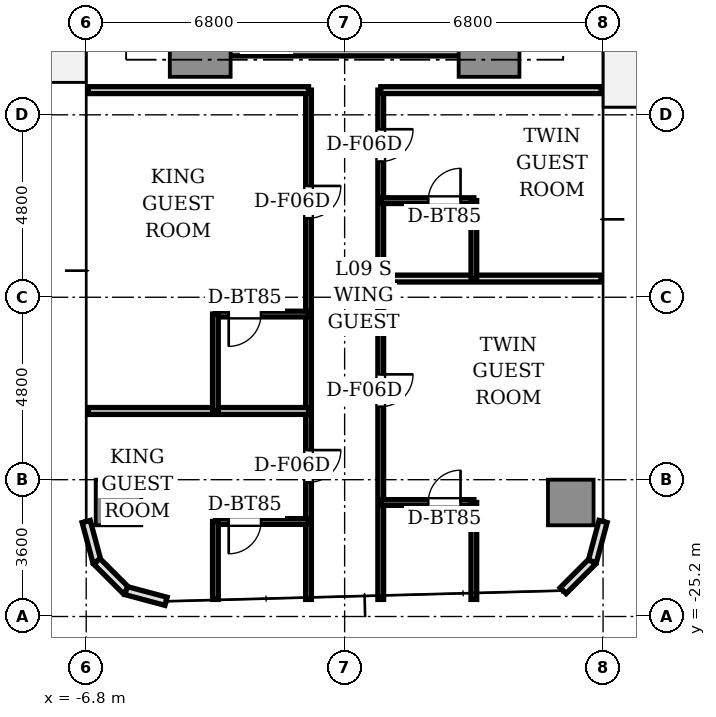
"""IFC4 building model, lengths in metres.
Left out: names, types, materials, properties, quantities, classifications, styles, units other than length and angle.
Written with IfcOpenShell. Run it as: python <this file> out.ifc"""

import sys

from ifc_helpers import new_model, si_unit, direction, frame, frame_2d, origin, origin_2d, place, context, subcontext, project, spatial, rectangle, extrude, source, transform, mapped, element, fill, save


model = new_model("IFC4")
c1 = context("Model", 3, precision=1e-05, world=origin(), true_north=direction((0.0, 1.0)))
c2 = subcontext(c1, "Body", "Model", "MODEL_VIEW")
j1 = project(units=[si_unit("LENGTHUNIT", "METRE"), si_unit("PLANEANGLEUNIT", "RADIAN")], contexts=[c1])
p1 = place(None, origin())
s1 = spatial("IfcSite", under=j1, at=p1, CompositionType="ELEMENT")
p2 = place(p1, origin())
s2 = spatial("IfcBuilding", under=s1, at=p2, CompositionType="ELEMENT")
p3 = place(p2, frame((0.0, 0.0, 36.5)))
s3 = spatial("IfcBuildingStorey", under=s2, at=p3, CompositionType="ELEMENT", Elevation=36.5)
p4 = place(p3, frame((-3.55, -10.2, 0.0), z_axis=(0.0, 0.0, 1.0), x_axis=(1.0, 0.0, 0.0)))
e1 = element("IfcWall", 1, at=p4, inside=s3, PredefinedType="SHEAR", context=c2, shape_type="SweptSolid", body=[
    extrude(rectangle(XDim=7.1, YDim=0.5, at=frame_2d((3.55, 0.0))), origin(), (0.0, 0.0, 1.0), 3.11),
])
m1 = source(origin(), c2, "Body", "SweptSolid", [
    extrude(rectangle(XDim=1.6, YDim=1.6, at=origin_2d()), origin(), (0.0, 0.0, 1.0), 3.11),
])
for number, where, z_axis, x_axis in (
    (2, (-3.8, -10.2, 0.0), (0.0, 0.0, 1.0), (1.0, 0.0, 0.0)),
    (3, (3.8, -10.2, 0.0), (0.0, 0.0, 1.0), (1.0, 0.0, 0.0)),
):
    element("IfcColumn", number, at=place(p3, frame(where, z_axis=z_axis, x_axis=x_axis)), inside=s3, PredefinedType="COLUMN", context=c2, shape_type="MappedRepresentation", body=[
        mapped(m1, transform((0.0, 0.0, 0.0), scale=1.0)),
    ])
m2 = source(origin(), c2, "Body", "SweptSolid", [
    extrude(rectangle(XDim=1.2, YDim=1.2, at=origin_2d()), origin(), (0.0, 0.0, 1.0), 3.11),
])
for number, where, z_axis, x_axis in (
    (4, (-5.95, -22.2, 0.0), (0.0, 0.0, 1.0), (1.0, 0.0, 0.0)),
    (5, (5.95, -22.2, 0.0), (0.0, 0.0, 1.0), (1.0, 0.0, 0.0)),
):
    element("IfcColumn", number, at=place(p3, frame(where, z_axis=z_axis, x_axis=x_axis)), inside=s3, PredefinedType="COLUMN", context=c2, shape_type="MappedRepresentation", body=[
        mapped(m2, transform((0.0, 0.0, 0.0), scale=1.0)),
    ])
for number, where, z_axis, x_axis in (
    (6, (-6.8, -22.7, 0.0), (0.0, 0.0, 1.0), (0.259, -0.966, 0.0)),
    (7, (-6.519, -23.75, 0.0), (0.0, 0.0, 1.0), (0.707, -0.707, 0.0)),
    (8, (-5.75, -24.519, 0.0), (0.0, 0.0, 1.0), (0.966, -0.259, 0.0)),
    (9, (5.75, -24.519, 0.0), (0.0, 0.0, 1.0), (0.707, 0.707, 0.0)),
    (10, (6.519, -23.75, 0.0), (0.0, 0.0, 1.0), (0.259, 0.966, 0.0)),
):
    element("IfcWall", number, at=place(p3, frame(where, z_axis=z_axis, x_axis=x_axis)), inside=s3, PredefinedType="STANDARD", context=c2, shape_type="SweptSolid", body=[
        extrude(rectangle(XDim=1.087, YDim=0.22, at=frame_2d((0.543, 0.0))), origin(), (0.0, 0.0, 1.0), 3.11),
    ])
p5 = place(p3, frame((0.95, -11.35, 0.0), z_axis=(0.0, 0.0, 1.0), x_axis=(0.0, -1.0, 0.0)))
e11 = element("IfcWall", 11, at=p5, inside=s3, PredefinedType="PARTITIONING", context=c2, shape_type="SweptSolid", body=[
    extrude(rectangle(XDim=13.4, YDim=0.15, at=frame_2d((6.7, 0.0))), origin(), (0.0, 0.0, 1.0), 2.66),
])
p6 = place(p5, frame((1.029, 0.0, 0.0)))
e12 = element("IfcOpeningElement", 12, at=p6, cuts=e11, PredefinedType="OPENING", context=c2, shape_type="SweptSolid", body=[
    extrude(rectangle(XDim=0.85, YDim=2.1, at=frame_2d((0.425, 1.05))), frame((0.0, 0.085, 0.0), z_axis=(0.0, -1.0, 0.0), x_axis=(1.0, 0.0, 0.0)), (0.0, 0.0, 1.0), 0.17),
])
p7 = place(p5, frame((7.479, 0.0, 0.0)))
e13 = element("IfcOpeningElement", 13, at=p7, cuts=e11, PredefinedType="OPENING", context=c2, shape_type="SweptSolid", body=[
    extrude(rectangle(XDim=0.85, YDim=2.1, at=frame_2d((0.425, 1.05))), frame((0.0, 0.085, 0.0), z_axis=(0.0, -1.0, 0.0), x_axis=(1.0, 0.0, 0.0)), (0.0, 0.0, 1.0), 0.17),
])
p8 = place(p3, frame((-0.95, -11.35, 0.0), z_axis=(0.0, 0.0, 1.0), x_axis=(0.0, -1.0, 0.0)))
e14 = element("IfcWall", 14, at=p8, inside=s3, PredefinedType="PARTITIONING", context=c2, shape_type="SweptSolid", body=[
    extrude(rectangle(XDim=13.4, YDim=0.15, at=frame_2d((6.7, 0.0))), origin(), (0.0, 0.0, 1.0), 2.66),
])
p9 = place(p8, frame((2.521, 0.0, 0.0)))
e15 = element("IfcOpeningElement", 15, at=p9, cuts=e14, PredefinedType="OPENING", context=c2, shape_type="SweptSolid", body=[
    extrude(rectangle(XDim=0.85, YDim=2.1, at=frame_2d((0.425, 1.05))), frame((0.0, 0.085, 0.0), z_axis=(0.0, -1.0, 0.0), x_axis=(1.0, 0.0, 0.0)), (0.0, 0.0, 1.0), 0.17),
])
p10 = place(p8, frame((9.471, 0.0, 0.0)))
e16 = element("IfcOpeningElement", 16, at=p10, cuts=e14, PredefinedType="OPENING", context=c2, shape_type="SweptSolid", body=[
    extrude(rectangle(XDim=0.85, YDim=2.1, at=frame_2d((0.425, 1.05))), frame((0.0, 0.085, 0.0), z_axis=(0.0, -1.0, 0.0), x_axis=(1.0, 0.0, 0.0)), (0.0, 0.0, 1.0), 0.17),
])
for number, where, z_axis, x_axis in (
    (17, (0.95, -11.35, 0.0), (0.0, 0.0, 1.0), (1.0, 0.0, 0.0)),
    (18, (-6.75, -11.35, 0.0), (0.0, 0.0, 1.0), (1.0, 0.0, 0.0)),
    (19, (0.95, -16.308, 0.0), (0.0, 0.0, 1.0), (1.0, 0.0, 0.0)),
):
    element("IfcWall", number, at=place(p3, frame(where, z_axis=z_axis, x_axis=x_axis)), inside=s3, PredefinedType="PARTITIONING", context=c2, shape_type="SweptSolid", body=[
        extrude(rectangle(XDim=5.8, YDim=0.18, at=frame_2d((2.9, 0.0))), origin(), (0.0, 0.0, 1.0), 2.66),
    ])
p11 = place(p3, frame((0.95, -14.258, 0.0), z_axis=(0.0, 0.0, 1.0), x_axis=(1.0, 0.0, 0.0)))
e20 = element("IfcWall", 20, at=p11, inside=s3, PredefinedType="PARTITIONING", context=c2, shape_type="SweptSolid", body=[
    extrude(rectangle(XDim=2.45, YDim=0.15, at=frame_2d((1.225, 0.0))), origin(), (0.0, 0.0, 1.0), 2.66),
])
p12 = place(p11, frame((1.25, 0.0, 0.0)))
e21 = element("IfcOpeningElement", 21, at=p12, cuts=e20, PredefinedType="OPENING", context=c2, shape_type="SweptSolid", body=[
    extrude(rectangle(XDim=0.85, YDim=2.1, at=frame_2d((0.425, 1.05))), frame((0.0, 0.085, 0.0), z_axis=(0.0, -1.0, 0.0), x_axis=(1.0, 0.0, 0.0)), (0.0, 0.0, 1.0), 0.17),
])
p13 = place(p3, frame((3.4, -14.258, 0.0), z_axis=(0.0, 0.0, 1.0), x_axis=(0.0, -1.0, 0.0)))
e22 = element("IfcWall", 22, at=p13, inside=s3, PredefinedType="PARTITIONING", context=c2, shape_type="SweptSolid", body=[
    extrude(rectangle(XDim=2.05, YDim=0.15, at=frame_2d((1.025, 0.0))), origin(), (0.0, 0.0, 1.0), 2.66),
])
p14 = place(p3, frame((0.95, -22.2, 0.0), z_axis=(0.0, 0.0, 1.0), x_axis=(1.0, 0.0, 0.0)))
e23 = element("IfcWall", 23, at=p14, inside=s3, PredefinedType="PARTITIONING", context=c2, shape_type="SweptSolid", body=[
    extrude(rectangle(XDim=2.45, YDim=0.15, at=frame_2d((1.225, 0.0))), origin(), (0.0, 0.0, 1.0), 2.58),
])
p15 = place(p14, frame((1.25, 0.0, 0.0)))
e24 = element("IfcOpeningElement", 24, at=p15, cuts=e23, PredefinedType="OPENING", context=c2, shape_type="SweptSolid", body=[
    extrude(rectangle(XDim=0.85, YDim=2.1, at=frame_2d((0.425, 1.05))), frame((0.0, 0.085, 0.0), z_axis=(0.0, -1.0, 0.0), x_axis=(1.0, 0.0, 0.0)), (0.0, 0.0, 1.0), 0.17),
])
p16 = place(p3, frame((3.4, -22.2, 0.0), z_axis=(0.0, 0.0, 1.0), x_axis=(0.0, -1.0, 0.0)))
e25 = element("IfcWall", 25, at=p16, inside=s3, PredefinedType="PARTITIONING", context=c2, shape_type="SweptSolid", body=[
    extrude(rectangle(XDim=2.55, YDim=0.15, at=frame_2d((1.275, 0.0))), origin(), (0.0, 0.0, 1.0), 2.66),
])
p17 = place(p3, frame((-0.95, -19.792, 0.0), z_axis=(0.0, 0.0, 1.0), x_axis=(-1.0, 0.0, 0.0)))
e26 = element("IfcWall", 26, at=p17, inside=s3, PredefinedType="PARTITIONING", context=c2, shape_type="SweptSolid", body=[
    extrude(rectangle(XDim=5.8, YDim=0.18, at=frame_2d((2.9, 0.0))), origin(), (0.0, 0.0, 1.0), 2.66),
])
p18 = place(p3, frame((-0.95, -17.242, 0.0), z_axis=(0.0, 0.0, 1.0), x_axis=(-1.0, 0.0, 0.0)))
e27 = element("IfcWall", 27, at=p18, inside=s3, PredefinedType="PARTITIONING", context=c2, shape_type="SweptSolid", body=[
    extrude(rectangle(XDim=2.45, YDim=0.15, at=frame_2d((1.225, 0.0))), origin(), (0.0, 0.0, 1.0), 2.66),
])
p19 = place(p18, frame((1.25, 0.0, 0.0)))
e28 = element("IfcOpeningElement", 28, at=p19, cuts=e27, PredefinedType="OPENING", context=c2, shape_type="SweptSolid", body=[
    extrude(rectangle(XDim=0.85, YDim=2.1, at=frame_2d((0.425, 1.05))), frame((0.0, 0.085, 0.0), z_axis=(0.0, -1.0, 0.0), x_axis=(1.0, 0.0, 0.0)), (0.0, 0.0, 1.0), 0.17),
])
p20 = place(p3, frame((-3.4, -17.242, 0.0), z_axis=(0.0, 0.0, 1.0), x_axis=(0.0, -1.0, 0.0)))
e29 = element("IfcWall", 29, at=p20, inside=s3, PredefinedType="PARTITIONING", context=c2, shape_type="SweptSolid", body=[
    extrude(rectangle(XDim=2.55, YDim=0.15, at=frame_2d((1.275, 0.0))), origin(), (0.0, 0.0, 1.0), 2.66),
])
p21 = place(p3, frame((-0.95, -22.7, 0.0), z_axis=(0.0, 0.0, 1.0), x_axis=(-1.0, 0.0, 0.0)))
e30 = element("IfcWall", 30, at=p21, inside=s3, PredefinedType="PARTITIONING", context=c2, shape_type="SweptSolid", body=[
    extrude(rectangle(XDim=2.45, YDim=0.15, at=frame_2d((1.225, 0.0))), origin(), (0.0, 0.0, 1.0), 2.66),
])
p22 = place(p21, frame((1.25, 0.0, 0.0)))
e31 = element("IfcOpeningElement", 31, at=p22, cuts=e30, PredefinedType="OPENING", context=c2, shape_type="SweptSolid", body=[
    extrude(rectangle(XDim=0.85, YDim=2.1, at=frame_2d((0.425, 1.05))), frame((0.0, 0.085, 0.0), z_axis=(0.0, -1.0, 0.0), x_axis=(1.0, 0.0, 0.0)), (0.0, 0.0, 1.0), 0.17),
])
p23 = place(p3, frame((-3.4, -22.7, 0.0), z_axis=(0.0, 0.0, 1.0), x_axis=(0.0, -1.0, 0.0)))
e32 = element("IfcWall", 32, at=p23, inside=s3, PredefinedType="PARTITIONING", context=c2, shape_type="SweptSolid", body=[
    extrude(rectangle(XDim=2.05, YDim=0.15, at=frame_2d((1.025, 0.0))), origin(), (0.0, 0.0, 1.0), 2.66),
])
m3 = source(origin(), c2, "Body", "SweptSolid", [
    extrude(rectangle(XDim=0.85, YDim=0.05, at=origin_2d()), origin(), (0.0, 0.0, 1.0), 2.1),
])
p24 = place(p12, frame((0.425, 0.0, 0.0)))
e33 = element("IfcDoor", 33, at=p24, inside=s3, OperationType="SINGLE_SWING_RIGHT", PredefinedType="DOOR", context=c2, shape_type="MappedRepresentation", body=[
    mapped(m3, transform((0.0, 0.0, 0.0), scale=1.0)),
])
fill(e21, e33)
p25 = place(p6, frame((0.425, 0.0, 0.0)))
e34 = element("IfcDoor", 34, at=p25, inside=s3, OperationType="SINGLE_SWING_LEFT", PredefinedType="DOOR", context=c2, shape_type="MappedRepresentation", body=[
    mapped(m3, transform((0.0, 0.0, 0.0), scale=1.0)),
])
fill(e12, e34)
p26 = place(p15, frame((0.425, 0.0, 0.0)))
e35 = element("IfcDoor", 35, at=p26, inside=s3, OperationType="SINGLE_SWING_RIGHT", PredefinedType="DOOR", context=c2, shape_type="MappedRepresentation", body=[
    mapped(m3, transform((0.0, 0.0, 0.0), scale=1.0)),
])
fill(e24, e35)
p27 = place(p7, frame((0.425, 0.0, 0.0)))
e36 = element("IfcDoor", 36, at=p27, inside=s3, OperationType="SINGLE_SWING_LEFT", PredefinedType="DOOR", context=c2, shape_type="MappedRepresentation", body=[
    mapped(m3, transform((0.0, 0.0, 0.0), scale=1.0)),
])
fill(e13, e36)
p28 = place(p19, frame((0.425, 0.0, 0.0)))
e37 = element("IfcDoor", 37, at=p28, inside=s3, OperationType="SINGLE_SWING_RIGHT", PredefinedType="DOOR", context=c2, shape_type="MappedRepresentation", body=[
    mapped(m3, transform((0.0, 0.0, 0.0), scale=1.0)),
])
fill(e28, e37)
p29 = place(p9, frame((0.425, 0.0, 0.0)))
e38 = element("IfcDoor", 38, at=p29, inside=s3, OperationType="SINGLE_SWING_LEFT", PredefinedType="DOOR", context=c2, shape_type="MappedRepresentation", body=[
    mapped(m3, transform((0.0, 0.0, 0.0), scale=1.0)),
])
fill(e15, e38)
p30 = place(p22, frame((0.425, 0.0, 0.0)))
e39 = element("IfcDoor", 39, at=p30, inside=s3, OperationType="SINGLE_SWING_RIGHT", PredefinedType="DOOR", context=c2, shape_type="MappedRepresentation", body=[
    mapped(m3, transform((0.0, 0.0, 0.0), scale=1.0)),
])
fill(e31, e39)
p31 = place(p10, frame((0.425, 0.0, 0.0)))
e40 = element("IfcDoor", 40, at=p31, inside=s3, OperationType="SINGLE_SWING_LEFT", PredefinedType="DOOR", context=c2, shape_type="MappedRepresentation", body=[
    mapped(m3, transform((0.0, 0.0, 0.0), scale=1.0)),
])
fill(e16, e40)
save(model, sys.argv[1])
